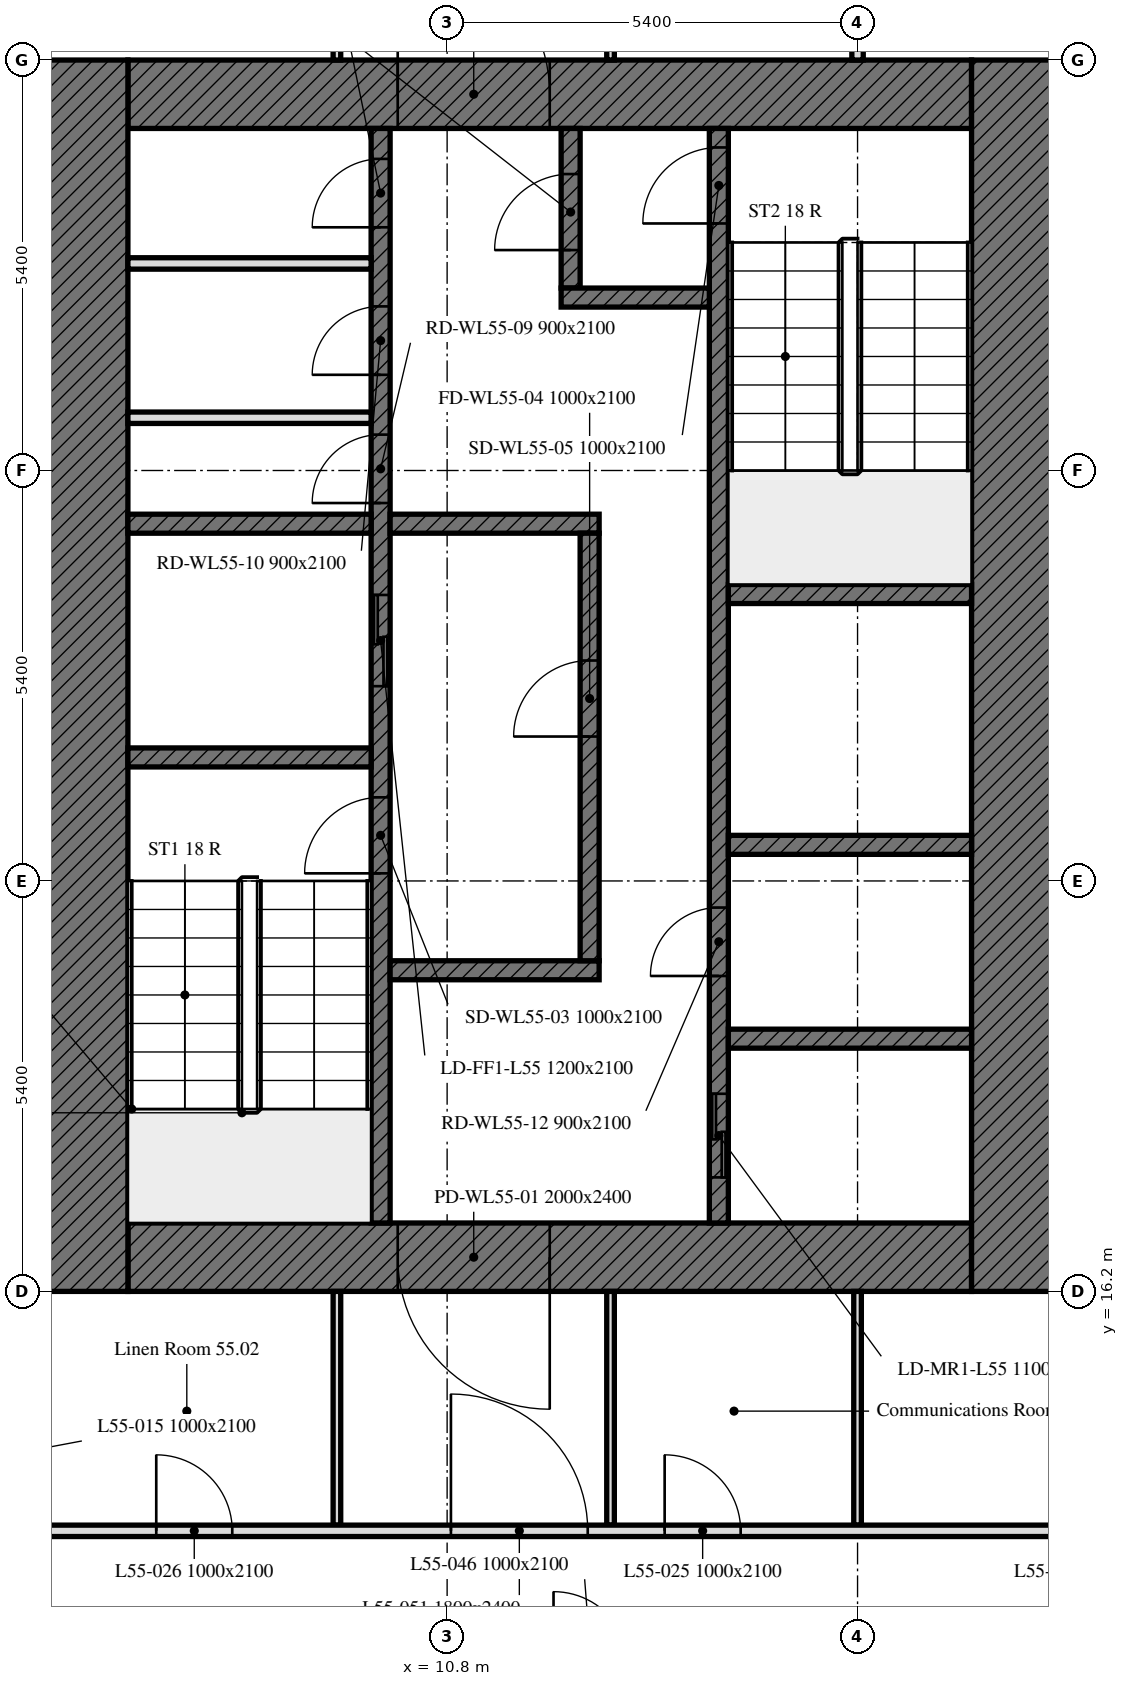
"""IFC4 building model, lengths in metres.
Left out: names, types, materials, properties, quantities, classifications, styles, units other than length and angle.
Written with IfcOpenShell. Run it as: python <this file> out.ifc"""

import sys

from ifc_helpers import new_model, si_unit, direction, frame, frame_2d, origin, place, context, subcontext, project, spatial, rectangle, extrude, element, fill, save


model = new_model("IFC4")
c1 = context("Model", 3, precision=1e-05, world=origin(), true_north=direction((0.0, 1.0)))
c2 = subcontext(c1, "Body", "Model", "MODEL_VIEW")
j1 = project(units=[si_unit("LENGTHUNIT", "METRE"), si_unit("PLANEANGLEUNIT", "RADIAN")], contexts=[c1])
p1 = place(None, origin())
s1 = spatial("IfcSite", under=j1, at=p1, CompositionType="ELEMENT")
p2 = place(p1, origin())
s2 = spatial("IfcBuilding", under=s1, at=p2, CompositionType="ELEMENT")
p3 = place(p2, frame((0.0, 0.0, 220.3)))
s3 = spatial("IfcBuildingStorey", under=s2, at=p3, CompositionType="ELEMENT", Elevation=220.3)
p4 = place(p3, frame((17.7, 16.65, 0.0), z_axis=(0.0, 0.0, 1.0), x_axis=(-1.0, 0.0, 0.0)))
e1 = element("IfcWall", 1, at=p4, inside=s3, PredefinedType="SOLIDWALL", context=c2, shape_type="SweptSolid", body=[
    extrude(rectangle(XDim=11.1, YDim=0.9, at=frame_2d((5.55, 0.0))), origin(), (0.0, 0.0, 1.0), 3.0),
])
p5 = place(p4, frame((5.55, 0.0, 0.0)))
e2 = element("IfcOpeningElement", 2, at=p5, cuts=e1, PredefinedType="OPENING", context=c2, shape_type="SweptSolid", body=[
    extrude(rectangle(XDim=2.0, YDim=2.4, at=frame_2d((1.0, 1.2))), frame((0.0, 0.45, 0.0), z_axis=(0.0, -1.0, 0.0), x_axis=(1.0, 0.0, 0.0)), (0.0, 0.0, 1.0), 0.9),
])
p6 = place(p3, frame((6.6, 31.95, 0.0), z_axis=(0.0, 0.0, 1.0), x_axis=(1.0, 0.0, 0.0)))
e3 = element("IfcWall", 3, at=p6, inside=s3, PredefinedType="SOLIDWALL", context=c2, shape_type="SweptSolid", body=[
    extrude(rectangle(XDim=11.1, YDim=0.9, at=frame_2d((5.55, 0.0))), origin(), (0.0, 0.0, 1.0), 3.0),
])
p7 = place(p6, frame((3.55, 0.0, 0.0)))
e4 = element("IfcOpeningElement", 4, at=p7, cuts=e3, PredefinedType="OPENING", context=c2, shape_type="SweptSolid", body=[
    extrude(rectangle(XDim=2.0, YDim=2.4, at=frame_2d((1.0, 1.2))), frame((0.0, 0.45, 0.0), z_axis=(0.0, -1.0, 0.0), x_axis=(1.0, 0.0, 0.0)), (0.0, 0.0, 1.0), 0.9),
])
for number, where, z_axis, x_axis in (
    (5, (6.0, 16.2, 0.0), (0.0, 0.0, 1.0), (0.0, 1.0, 0.0)),
    (6, (18.3, 32.4, 0.0), (0.0, 0.0, 1.0), (0.0, -1.0, 0.0)),
):
    element("IfcWall", number, at=place(p3, frame(where, z_axis=z_axis, x_axis=x_axis)), inside=s3, PredefinedType="SOLIDWALL", context=c2, shape_type="SweptSolid", body=[
        extrude(rectangle(XDim=16.2, YDim=1.2, at=frame_2d((8.1, 0.0))), origin(), (0.0, 0.0, 1.0), 3.0),
    ])
p8 = place(p3, frame((9.925, 17.1, 0.0), z_axis=(0.0, 0.0, 1.0), x_axis=(0.0, 1.0, 0.0)))
e7 = element("IfcWall", 7, at=p8, inside=s3, PredefinedType="SOLIDWALL", context=c2, shape_type="SweptSolid", body=[
    extrude(rectangle(XDim=14.4, YDim=0.25, at=frame_2d((7.2, 0.0))), origin(), (0.0, 0.0, 1.0), 3.0),
])
p9 = place(p8, frame((4.6, 0.0, 0.0)))
e8 = element("IfcOpeningElement", 8, at=p9, cuts=e7, PredefinedType="OPENING", context=c2, shape_type="SweptSolid", body=[
    extrude(rectangle(XDim=1.0, YDim=2.1, at=frame_2d((0.5, 1.05))), frame((0.0, 0.125, 0.0), z_axis=(0.0, -1.0, 0.0), x_axis=(1.0, 0.0, 0.0)), (0.0, 0.0, 1.0), 0.25),
])
p10 = place(p8, frame((7.062, 0.0, 0.0)))
e9 = element("IfcOpeningElement", 9, at=p10, cuts=e7, PredefinedType="OPENING", context=c2, shape_type="SweptSolid", body=[
    extrude(rectangle(XDim=1.2, YDim=2.1, at=frame_2d((0.6, 1.05))), frame((0.0, 0.125, 0.0), z_axis=(0.0, -1.0, 0.0), x_axis=(1.0, 0.0, 0.0)), (0.0, 0.0, 1.0), 0.25),
])
p11 = place(p8, frame((9.472, 0.0, 0.0)))
e10 = element("IfcOpeningElement", 10, at=p11, cuts=e7, PredefinedType="OPENING", context=c2, shape_type="SweptSolid", body=[
    extrude(rectangle(XDim=0.9, YDim=2.1, at=frame_2d((0.45, 1.05))), frame((0.0, 0.125, 0.0), z_axis=(0.0, -1.0, 0.0), x_axis=(1.0, 0.0, 0.0)), (0.0, 0.0, 1.0), 0.25),
])
p12 = place(p8, frame((11.159, 0.0, 0.0)))
e11 = element("IfcOpeningElement", 11, at=p12, cuts=e7, PredefinedType="OPENING", context=c2, shape_type="SweptSolid", body=[
    extrude(rectangle(XDim=0.9, YDim=2.1, at=frame_2d((0.45, 1.05))), frame((0.0, 0.125, 0.0), z_axis=(0.0, -1.0, 0.0), x_axis=(1.0, 0.0, 0.0)), (0.0, 0.0, 1.0), 0.25),
])
p13 = place(p8, frame((13.1, 0.0, 0.0)))
e12 = element("IfcOpeningElement", 12, at=p13, cuts=e7, PredefinedType="OPENING", context=c2, shape_type="SweptSolid", body=[
    extrude(rectangle(XDim=0.9, YDim=2.1, at=frame_2d((0.45, 1.05))), frame((0.0, 0.125, 0.0), z_axis=(0.0, -1.0, 0.0), x_axis=(1.0, 0.0, 0.0)), (0.0, 0.0, 1.0), 0.25),
])
p14 = place(p3, frame((14.375, 17.1, 0.0), z_axis=(0.0, 0.0, 1.0), x_axis=(0.0, 1.0, 0.0)))
e13 = element("IfcWall", 13, at=p14, inside=s3, PredefinedType="SOLIDWALL", context=c2, shape_type="SweptSolid", body=[
    extrude(rectangle(XDim=14.4, YDim=0.25, at=frame_2d((7.2, 0.0))), origin(), (0.0, 0.0, 1.0), 3.0),
])
p15 = place(p14, frame((13.15, 0.0, 0.0)))
e14 = element("IfcOpeningElement", 14, at=p15, cuts=e13, PredefinedType="OPENING", context=c2, shape_type="SweptSolid", body=[
    extrude(rectangle(XDim=1.0, YDim=2.1, at=frame_2d((0.5, 1.05))), frame((0.0, 0.125, 0.0), z_axis=(0.0, -1.0, 0.0), x_axis=(1.0, 0.0, 0.0)), (0.0, 0.0, 1.0), 0.25),
])
p16 = place(p14, frame((0.6, 0.0, 0.0)))
e15 = element("IfcOpeningElement", 15, at=p16, cuts=e13, PredefinedType="OPENING", context=c2, shape_type="SweptSolid", body=[
    extrude(rectangle(XDim=1.1, YDim=2.1, at=frame_2d((0.55, 1.05))), frame((0.0, 0.125, 0.0), z_axis=(0.0, -1.0, 0.0), x_axis=(1.0, 0.0, 0.0)), (0.0, 0.0, 1.0), 0.25),
])
p17 = place(p14, frame((3.25, 0.0, 0.0)))
e16 = element("IfcOpeningElement", 16, at=p17, cuts=e13, PredefinedType="OPENING", context=c2, shape_type="SweptSolid", body=[
    extrude(rectangle(XDim=0.9, YDim=2.1, at=frame_2d((0.45, 1.05))), frame((0.0, 0.125, 0.0), z_axis=(0.0, -1.0, 0.0), x_axis=(1.0, 0.0, 0.0)), (0.0, 0.0, 1.0), 0.25),
])
for number, where, z_axis, x_axis in (
    (17, (6.6, 23.225, 0.0), (0.0, 0.0, 1.0), (1.0, 0.0, 0.0)),
    (18, (14.5, 25.375, 0.0), (0.0, 0.0, 1.0), (1.0, 0.0, 0.0)),
    (19, (14.5, 22.075, 0.0), (0.0, 0.0, 1.0), (1.0, 0.0, 0.0)),
    (20, (6.6, 26.3, 0.0), (0.0, 0.0, 1.0), (1.0, 0.0, 0.0)),
):
    element("IfcWall", number, at=place(p3, frame(where, z_axis=z_axis, x_axis=x_axis)), inside=s3, PredefinedType="SOLIDWALL", context=c2, shape_type="SweptSolid", body=[
        extrude(rectangle(XDim=3.2, YDim=0.25, at=frame_2d((1.6, 0.0))), origin(), (0.0, 0.0, 1.0), 3.0),
    ])
for number, where, z_axis, x_axis in (
    (21, (10.05, 26.3, 0.0), (0.0, 0.0, 1.0), (1.0, 0.0, 0.0)),
    (22, (10.05, 20.425, 0.0), (0.0, 0.0, 1.0), (1.0, 0.0, 0.0)),
):
    element("IfcWall", number, at=place(p3, frame(where, z_axis=z_axis, x_axis=x_axis)), inside=s3, PredefinedType="SOLIDWALL", context=c2, shape_type="SweptSolid", body=[
        extrude(rectangle(XDim=2.75, YDim=0.25, at=frame_2d((1.375, 0.0))), origin(), (0.0, 0.0, 1.0), 3.0),
    ])
p18 = place(p3, frame((12.425, 29.4, 0.0), z_axis=(0.0, 0.0, 1.0), x_axis=(0.0, 1.0, 0.0)))
e23 = element("IfcWall", 23, at=p18, inside=s3, PredefinedType="SOLIDWALL", context=c2, shape_type="SweptSolid", body=[
    extrude(rectangle(XDim=2.1, YDim=0.25, at=frame_2d((1.05, 0.0))), origin(), (0.0, 0.0, 1.0), 3.0),
])
p19 = place(p18, frame((0.5, 0.0, 0.0)))
e24 = element("IfcOpeningElement", 24, at=p19, cuts=e23, PredefinedType="OPENING", context=c2, shape_type="SweptSolid", body=[
    extrude(rectangle(XDim=1.0, YDim=2.1, at=frame_2d((0.5, 1.05))), frame((0.0, 0.125, 0.0), z_axis=(0.0, -1.0, 0.0), x_axis=(1.0, 0.0, 0.0)), (0.0, 0.0, 1.0), 0.25),
])
p20 = place(p3, frame((12.3, 29.275, 0.0), z_axis=(0.0, 0.0, 1.0), x_axis=(1.0, 0.0, 0.0)))
e25 = element("IfcWall", 25, at=p20, inside=s3, PredefinedType="SOLIDWALL", context=c2, shape_type="SweptSolid", body=[
    extrude(rectangle(XDim=1.95, YDim=0.25, at=frame_2d((0.975, 0.0))), origin(), (0.0, 0.0, 1.0), 3.0),
])
p21 = place(p3, frame((12.675, 20.55, 0.0), z_axis=(0.0, 0.0, 1.0), x_axis=(0.0, 1.0, 0.0)))
e26 = element("IfcWall", 26, at=p21, inside=s3, PredefinedType="SOLIDWALL", context=c2, shape_type="SweptSolid", body=[
    extrude(rectangle(XDim=5.625, YDim=0.25, at=frame_2d((2.812, 0.0))), origin(), (0.0, 0.0, 1.0), 3.0),
])
p22 = place(p21, frame((2.95, 0.0, 0.0)))
e27 = element("IfcOpeningElement", 27, at=p22, cuts=e26, PredefinedType="OPENING", context=c2, shape_type="SweptSolid", body=[
    extrude(rectangle(XDim=1.0, YDim=2.1, at=frame_2d((0.5, 1.05))), frame((0.0, 0.125, 0.0), z_axis=(0.0, -1.0, 0.0), x_axis=(1.0, 0.0, 0.0)), (0.0, 0.0, 1.0), 0.25),
])
p23 = place(p3, frame((14.5, 19.525, 0.0), z_axis=(0.0, 0.0, 1.0), x_axis=(1.0, 0.0, 0.0)))
e28 = element("IfcWall", 28, at=p23, inside=s3, PredefinedType="SOLIDWALL", context=c2, shape_type="SweptSolid", body=[
    extrude(rectangle(XDim=3.2, YDim=0.25, at=frame_2d((1.6, 0.0))), origin(), (0.0, 0.0, 1.0), 3.0),
])
for number, where, z_axis, x_axis in (
    (29, (6.6, 27.694, 0.0), (0.0, 0.0, 1.0), (1.0, 0.0, 0.0)),
    (30, (6.6, 29.724, 0.0), (0.0, 0.0, 1.0), (1.0, 0.0, 0.0)),
):
    element("IfcWall", number, at=place(p3, frame(where, z_axis=z_axis, x_axis=x_axis)), inside=s3, PredefinedType="PARTITIONING", context=c2, shape_type="SweptSolid", body=[
        extrude(rectangle(XDim=3.2, YDim=0.15, at=frame_2d((1.6, 0.0))), origin(), (0.0, 0.0, 1.0), 3.0),
    ])
p24 = place(p3, frame((16.2, 37.405, 0.0), z_axis=(0.0, 0.0, 1.0), x_axis=(0.0, -1.0, 0.0)))
e31 = element("IfcWall", 31, at=p24, inside=s3, PredefinedType="PARTITIONING", context=c2, shape_type="SweptSolid", body=[
    extrude(rectangle(XDim=5.005, YDim=0.15, at=frame_2d((2.502, 0.0))), origin(), (0.0, 0.0, 1.0), 2.4),
])
for number, where, z_axis, x_axis in (
    (32, (12.95, 32.4, 0.0), (0.0, 0.0, 1.0), (0.0, 1.0, 0.0)),
    (33, (9.35, 39.525, 0.0), (0.0, 0.0, 1.0), (0.0, -1.0, 0.0)),
):
    element("IfcWall", number, at=place(p3, frame(where, z_axis=z_axis, x_axis=x_axis)), inside=s3, PredefinedType="PARTITIONING", context=c2, shape_type="SweptSolid", body=[
        extrude(rectangle(XDim=7.125, YDim=0.1, at=frame_2d((3.562, 0.0))), origin(), (0.0, 0.0, 1.0), 2.4),
    ])
for number, where, z_axis, x_axis in (
    (34, (16.2, 16.2, 0.0), (0.0, 0.0, 1.0), (0.0, -1.0, 0.0)),
    (35, (12.95, 13.125, 0.0), (0.0, 0.0, 1.0), (0.0, 1.0, 0.0)),
    (36, (9.35, 16.2, 0.0), (0.0, 0.0, 1.0), (0.0, -1.0, 0.0)),
):
    element("IfcWall", number, at=place(p3, frame(where, z_axis=z_axis, x_axis=x_axis)), inside=s3, PredefinedType="PARTITIONING", context=c2, shape_type="SweptSolid", body=[
        extrude(rectangle(XDim=3.075, YDim=0.1, at=frame_2d((1.538, 0.0))), origin(), (0.0, 0.0, 1.0), 3.0),
    ])
p25 = place(p3, frame((5.325, 13.05, 0.0), z_axis=(0.0, 0.0, 1.0), x_axis=(1.0, 0.0, 0.0)))
e37 = element("IfcWall", 37, at=p25, inside=s3, PredefinedType="PARTITIONING", context=c2, shape_type="SweptSolid", body=[
    extrude(rectangle(XDim=37.124, YDim=0.15, at=frame_2d((18.562, 0.0))), origin(), (0.0, 0.0, 1.0), 3.0),
])
p26 = place(p25, frame((23.875, 0.0, 0.0)))
e38 = element("IfcOpeningElement", 38, at=p26, cuts=e37, PredefinedType="OPENING", context=c2, shape_type="SweptSolid", body=[
    extrude(rectangle(XDim=1.0, YDim=2.1, at=frame_2d((0.5, 1.05))), frame((0.0, 0.075, 0.0), z_axis=(0.0, -1.0, 0.0), x_axis=(1.0, 0.0, 0.0)), (0.0, 0.0, 1.0), 0.15),
])
p27 = place(p25, frame((13.475, 0.0, 0.0)))
e39 = element("IfcOpeningElement", 39, at=p27, cuts=e37, PredefinedType="OPENING", context=c2, shape_type="SweptSolid", body=[
    extrude(rectangle(XDim=1.0, YDim=2.1, at=frame_2d((0.5, 1.05))), frame((0.0, 0.075, 0.0), z_axis=(0.0, -1.0, 0.0), x_axis=(1.0, 0.0, 0.0)), (0.0, 0.0, 1.0), 0.15),
])
p28 = place(p25, frame((34.095, 0.0, 0.0)))
e40 = element("IfcOpeningElement", 40, at=p28, cuts=e37, PredefinedType="OPENING", context=c2, shape_type="SweptSolid", body=[
    extrude(rectangle(XDim=1.0, YDim=2.1, at=frame_2d((0.5, 1.05))), frame((0.0, 0.075, 0.0), z_axis=(0.0, -1.0, 0.0), x_axis=(1.0, 0.0, 0.0)), (0.0, 0.0, 1.0), 0.15),
])
p29 = place(p25, frame((8.337, 0.0, 0.0)))
e41 = element("IfcOpeningElement", 41, at=p29, cuts=e37, PredefinedType="OPENING", context=c2, shape_type="SweptSolid", body=[
    extrude(rectangle(XDim=1.0, YDim=2.1, at=frame_2d((0.5, 1.05))), frame((0.0, 0.075, 0.0), z_axis=(0.0, -1.0, 0.0), x_axis=(1.0, 0.0, 0.0)), (0.0, 0.0, 1.0), 0.15),
])
p30 = place(p25, frame((1.648, 0.0, 0.0)))
e42 = element("IfcOpeningElement", 42, at=p30, cuts=e37, PredefinedType="OPENING", context=c2, shape_type="SweptSolid", body=[
    extrude(rectangle(XDim=1.0, YDim=2.1, at=frame_2d((0.5, 1.05))), frame((0.0, 0.075, 0.0), z_axis=(0.0, -1.0, 0.0), x_axis=(1.0, 0.0, 0.0)), (0.0, 0.0, 1.0), 0.15),
])
p31 = place(p25, frame((28.613, 0.0, 0.0)))
e43 = element("IfcOpeningElement", 43, at=p31, cuts=e37, PredefinedType="OPENING", context=c2, shape_type="SweptSolid", body=[
    extrude(rectangle(XDim=1.0, YDim=2.1, at=frame_2d((0.5, 1.05))), frame((0.0, 0.075, 0.0), z_axis=(0.0, -1.0, 0.0), x_axis=(1.0, 0.0, 0.0)), (0.0, 0.0, 1.0), 0.15),
])
p32 = place(p25, frame((30.625, 0.0, 0.0)))
e44 = element("IfcOpeningElement", 44, at=p32, cuts=e37, PredefinedType="OPENING", context=c2, shape_type="SweptSolid", body=[
    extrude(rectangle(XDim=1.8, YDim=2.4, at=frame_2d((0.9, 1.2))), frame((0.0, 0.075, 0.0), z_axis=(0.0, -1.0, 0.0), x_axis=(1.0, 0.0, 0.0)), (0.0, 0.0, 1.0), 0.15),
])
p33 = place(p25, frame((5.525, 0.0, 0.0)))
e45 = element("IfcOpeningElement", 45, at=p33, cuts=e37, PredefinedType="OPENING", context=c2, shape_type="SweptSolid", body=[
    extrude(rectangle(XDim=1.8, YDim=2.4, at=frame_2d((0.9, 1.2))), frame((0.0, 0.075, 0.0), z_axis=(0.0, -1.0, 0.0), x_axis=(1.0, 0.0, 0.0)), (0.0, 0.0, 1.0), 0.15),
])
p34 = place(p5, origin())
e46 = element("IfcDoor", 46, at=p34, inside=s3, OperationType="DOUBLE_DOOR_SINGLE_SWING", PredefinedType="DOOR", context=c2, shape_type="SweptSolid", body=[
    extrude(rectangle(XDim=2.0, YDim=2.4, at=frame_2d((1.0, 1.2))), frame((0.0, 0.025, 0.0), z_axis=(0.0, -1.0, 0.0), x_axis=(1.0, 0.0, 0.0)), (0.0, 0.0, 1.0), 0.05),
])
fill(e2, e46)
p35 = place(p7, origin())
e47 = element("IfcDoor", 47, at=p35, inside=s3, OperationType="DOUBLE_DOOR_SINGLE_SWING", PredefinedType="DOOR", context=c2, shape_type="SweptSolid", body=[
    extrude(rectangle(XDim=2.0, YDim=2.4, at=frame_2d((1.0, 1.2))), frame((0.0, 0.025, 0.0), z_axis=(0.0, -1.0, 0.0), x_axis=(1.0, 0.0, 0.0)), (0.0, 0.0, 1.0), 0.05),
])
fill(e4, e47)
p36 = place(p9, origin())
e48 = element("IfcDoor", 48, at=p36, inside=s3, OperationType="SINGLE_SWING_LEFT", PredefinedType="DOOR", context=c2, shape_type="SweptSolid", body=[
    extrude(rectangle(XDim=1.0, YDim=2.1, at=frame_2d((0.5, 1.05))), frame((0.0, 0.025, 0.0), z_axis=(0.0, -1.0, 0.0), x_axis=(1.0, 0.0, 0.0)), (0.0, 0.0, 1.0), 0.05),
])
fill(e8, e48)
p37 = place(p22, origin())
e49 = element("IfcDoor", 49, at=p37, inside=s3, OperationType="SINGLE_SWING_LEFT", PredefinedType="DOOR", context=c2, shape_type="SweptSolid", body=[
    extrude(rectangle(XDim=1.0, YDim=2.1, at=frame_2d((0.5, 1.05))), frame((0.0, 0.025, 0.0), z_axis=(0.0, -1.0, 0.0), x_axis=(1.0, 0.0, 0.0)), (0.0, 0.0, 1.0), 0.05),
])
fill(e27, e49)
p38 = place(p15, origin())
e50 = element("IfcDoor", 50, at=p38, inside=s3, OperationType="SINGLE_SWING_LEFT", PredefinedType="DOOR", context=c2, shape_type="SweptSolid", body=[
    extrude(rectangle(XDim=1.0, YDim=2.1, at=frame_2d((0.5, 1.05))), frame((0.0, 0.025, 0.0), z_axis=(0.0, -1.0, 0.0), x_axis=(1.0, 0.0, 0.0)), (0.0, 0.0, 1.0), 0.05),
])
fill(e14, e50)
p39 = place(p19, origin())
e51 = element("IfcDoor", 51, at=p39, inside=s3, OperationType="SINGLE_SWING_LEFT", PredefinedType="DOOR", context=c2, shape_type="SweptSolid", body=[
    extrude(rectangle(XDim=1.0, YDim=2.1, at=frame_2d((0.5, 1.05))), frame((0.0, 0.025, 0.0), z_axis=(0.0, -1.0, 0.0), x_axis=(1.0, 0.0, 0.0)), (0.0, 0.0, 1.0), 0.05),
])
fill(e24, e51)
p40 = place(p10, origin())
e52 = element("IfcDoor", 52, at=p40, inside=s3, OperationType="DOUBLE_DOOR_SLIDING", PredefinedType="DOOR", context=c2, shape_type="SweptSolid", body=[
    extrude(rectangle(XDim=1.2, YDim=2.1, at=frame_2d((0.6, 1.05))), frame((0.0, 0.025, 0.0), z_axis=(0.0, -1.0, 0.0), x_axis=(1.0, 0.0, 0.0)), (0.0, 0.0, 1.0), 0.05),
])
fill(e9, e52)
p41 = place(p16, origin())
e53 = element("IfcDoor", 53, at=p41, inside=s3, OperationType="DOUBLE_DOOR_SLIDING", PredefinedType="DOOR", context=c2, shape_type="SweptSolid", body=[
    extrude(rectangle(XDim=1.1, YDim=2.1, at=frame_2d((0.55, 1.05))), frame((0.0, 0.025, 0.0), z_axis=(0.0, -1.0, 0.0), x_axis=(1.0, 0.0, 0.0)), (0.0, 0.0, 1.0), 0.05),
])
fill(e15, e53)
p42 = place(p11, origin())
e54 = element("IfcDoor", 54, at=p42, inside=s3, OperationType="SINGLE_SWING_LEFT", PredefinedType="DOOR", context=c2, shape_type="SweptSolid", body=[
    extrude(rectangle(XDim=0.9, YDim=2.1, at=frame_2d((0.45, 1.05))), frame((0.0, 0.025, 0.0), z_axis=(0.0, -1.0, 0.0), x_axis=(1.0, 0.0, 0.0)), (0.0, 0.0, 1.0), 0.05),
])
fill(e10, e54)
p43 = place(p12, origin())
e55 = element("IfcDoor", 55, at=p43, inside=s3, OperationType="SINGLE_SWING_LEFT", PredefinedType="DOOR", context=c2, shape_type="SweptSolid", body=[
    extrude(rectangle(XDim=0.9, YDim=2.1, at=frame_2d((0.45, 1.05))), frame((0.0, 0.025, 0.0), z_axis=(0.0, -1.0, 0.0), x_axis=(1.0, 0.0, 0.0)), (0.0, 0.0, 1.0), 0.05),
])
fill(e11, e55)
p44 = place(p13, origin())
e56 = element("IfcDoor", 56, at=p44, inside=s3, OperationType="SINGLE_SWING_LEFT", PredefinedType="DOOR", context=c2, shape_type="SweptSolid", body=[
    extrude(rectangle(XDim=0.9, YDim=2.1, at=frame_2d((0.45, 1.05))), frame((0.0, 0.025, 0.0), z_axis=(0.0, -1.0, 0.0), x_axis=(1.0, 0.0, 0.0)), (0.0, 0.0, 1.0), 0.05),
])
fill(e12, e56)
p45 = place(p17, origin())
e57 = element("IfcDoor", 57, at=p45, inside=s3, OperationType="SINGLE_SWING_LEFT", PredefinedType="DOOR", context=c2, shape_type="SweptSolid", body=[
    extrude(rectangle(XDim=0.9, YDim=2.1, at=frame_2d((0.45, 1.05))), frame((0.0, 0.025, 0.0), z_axis=(0.0, -1.0, 0.0), x_axis=(1.0, 0.0, 0.0)), (0.0, 0.0, 1.0), 0.05),
])
fill(e16, e57)
p46 = place(p29, origin())
e58 = element("IfcDoor", 58, at=p46, inside=s3, OperationType="SINGLE_SWING_RIGHT", PredefinedType="DOOR", context=c2, shape_type="SweptSolid", body=[
    extrude(rectangle(XDim=1.0, YDim=2.1, at=frame_2d((0.5, 1.05))), frame((0.0, 0.025, 0.0), z_axis=(0.0, -1.0, 0.0), x_axis=(1.0, 0.0, 0.0)), (0.0, 0.0, 1.0), 0.05),
])
fill(e41, e58)
p47 = place(p30, origin())
e59 = element("IfcDoor", 59, at=p47, inside=s3, OperationType="SINGLE_SWING_LEFT", PredefinedType="DOOR", context=c2, shape_type="SweptSolid", body=[
    extrude(rectangle(XDim=1.0, YDim=2.1, at=frame_2d((0.5, 1.05))), frame((0.0, 0.025, 0.0), z_axis=(0.0, -1.0, 0.0), x_axis=(1.0, 0.0, 0.0)), (0.0, 0.0, 1.0), 0.05),
])
fill(e42, e59)
p48 = place(p33, origin())
e60 = element("IfcDoor", 60, at=p48, inside=s3, OperationType="DOUBLE_DOOR_SINGLE_SWING", PredefinedType="DOOR", context=c2, shape_type="SweptSolid", body=[
    extrude(rectangle(XDim=1.8, YDim=2.4, at=frame_2d((0.9, 1.2))), frame((0.0, 0.025, 0.0), z_axis=(0.0, -1.0, 0.0), x_axis=(1.0, 0.0, 0.0)), (0.0, 0.0, 1.0), 0.05),
])
fill(e45, e60)
save(model, sys.argv[1])
